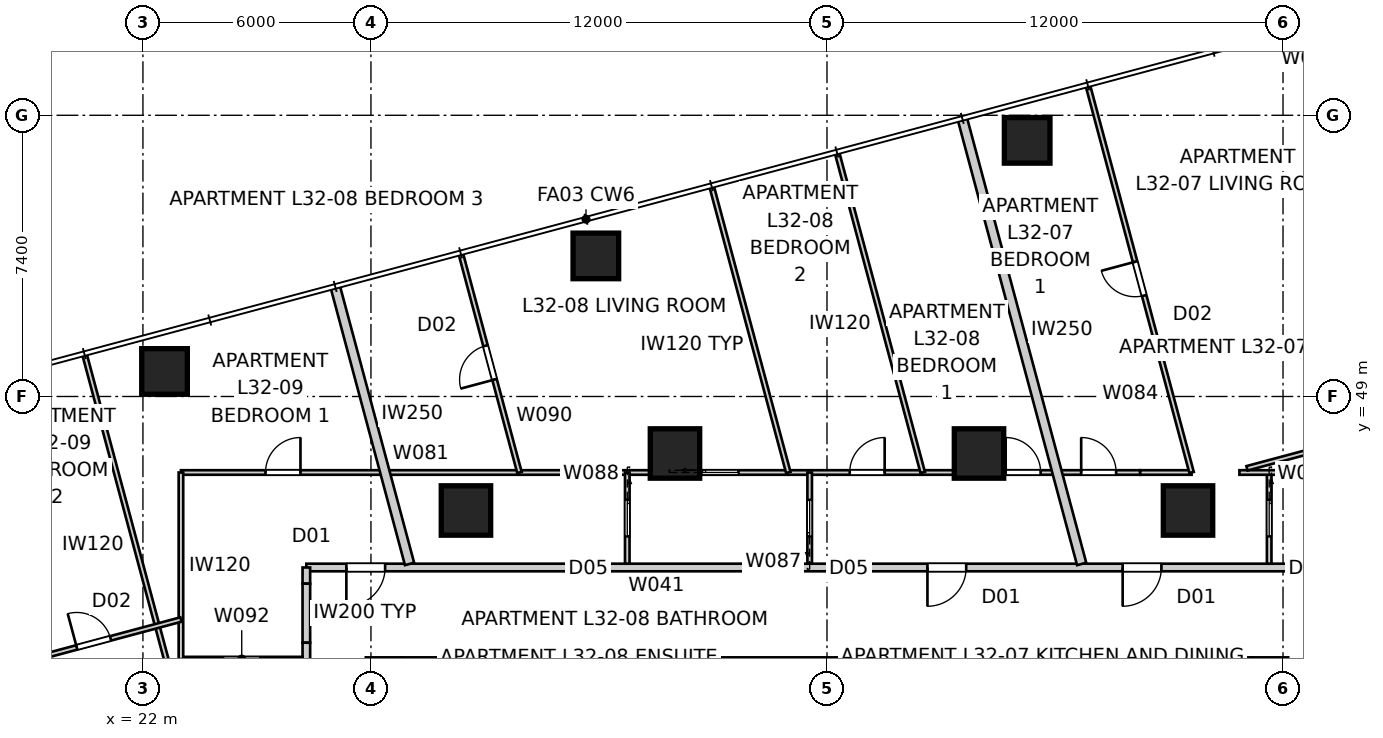
"""IFC4 building model, lengths in metres.
Left out: names, types, materials, properties, quantities, classifications, styles, units other than length and angle.
Written with IfcOpenShell. Run it as: python <this file> out.ifc"""

import sys

from ifc_helpers import new_model, si_unit, direction, frame, frame_2d, origin, origin_2d, place, context, subcontext, project, spatial, rectangle, extrude, element, fill, save


model = new_model("IFC4")
c1 = context("Model", 3, precision=1e-05, world=origin(), true_north=direction((0.0, 1.0)))
c2 = subcontext(c1, "Body", "Model", "MODEL_VIEW")
j1 = project(units=[si_unit("LENGTHUNIT", "METRE"), si_unit("PLANEANGLEUNIT", "RADIAN")], contexts=[c1])
p1 = place(None, origin())
s1 = spatial("IfcSite", under=j1, at=p1, CompositionType="ELEMENT")
p2 = place(p1, origin())
s2 = spatial("IfcBuilding", under=s1, at=p2, CompositionType="ELEMENT")
p3 = place(p2, frame((0.0, 0.0, 118.4)))
s3 = spatial("IfcBuildingStorey", under=s2, at=p3, CompositionType="ELEMENT", Elevation=118.4)
for number, where, z_axis, x_axis in (
    (1, (45.267, 55.74, 0.0), (0.0, 0.0, 1.0), (1.0, 0.0, 0.0)),
    (2, (33.918, 52.699, 0.0), (0.0, 0.0, 1.0), (1.0, 0.0, 0.0)),
    (3, (22.568, 49.658, 0.0), (0.0, 0.0, 1.0), (1.0, 0.0, 0.0)),
):
    element("IfcColumn", number, at=place(p3, frame(where, z_axis=z_axis, x_axis=x_axis)), inside=s3, PredefinedType="COLUMN", context=c2, shape_type="SweptSolid", body=[
        extrude(rectangle(XDim=1.2, YDim=1.2, at=origin_2d()), origin(), (0.0, 0.0, 1.0), 3.4),
    ])
for number, where, z_axis, x_axis in (
    (4, (49.5, 46.0, 0.0), (0.0, 0.0, 1.0), (1.0, 0.0, 0.0)),
    (5, (44.0, 47.5, 0.0), (0.0, 0.0, 1.0), (1.0, 0.0, 0.0)),
    (6, (36.0, 47.5, 0.0), (0.0, 0.0, 1.0), (1.0, 0.0, 0.0)),
    (7, (30.5, 46.0, 0.0), (0.0, 0.0, 1.0), (1.0, 0.0, 0.0)),
):
    element("IfcColumn", number, at=place(p3, frame(where, z_axis=z_axis, x_axis=x_axis)), inside=s3, PredefinedType="COLUMN", context=c2, shape_type="SweptSolid", body=[
        extrude(rectangle(XDim=1.3, YDim=1.3, at=origin_2d()), origin(), (0.0, 0.0, 1.0), 3.4),
    ])
p4 = place(p3, frame((54.5, 44.5, 0.0), z_axis=(0.0, 0.0, 1.0), x_axis=(-1.0, 0.0, 0.0)))
e8 = element("IfcWall", 8, at=p4, inside=s3, PredefinedType="PARTITIONING", context=c2, shape_type="SweptSolid", body=[
    extrude(rectangle(XDim=28.2, YDim=0.2, at=frame_2d((14.1, 0.0))), origin(), (0.0, 0.0, 1.0), 3.25),
])
p5 = place(p4, frame((10.837, 0.0, 0.0)))
e9 = element("IfcOpeningElement", 9, at=p5, cuts=e8, PredefinedType="OPENING", context=c2, shape_type="SweptSolid", body=[
    extrude(rectangle(XDim=1.02, YDim=2.34, at=frame_2d((0.51, 1.17))), frame((0.0, 0.11, 0.0), z_axis=(0.0, -1.0, 0.0), x_axis=(1.0, 0.0, 0.0)), (0.0, 0.0, 1.0), 0.22),
])
p6 = place(p4, frame((5.7, 0.0, 0.0)))
e10 = element("IfcOpeningElement", 10, at=p6, cuts=e8, PredefinedType="OPENING", context=c2, shape_type="SweptSolid", body=[
    extrude(rectangle(XDim=1.02, YDim=2.34, at=frame_2d((0.51, 1.17))), frame((0.0, 0.11, 0.0), z_axis=(0.0, -1.0, 0.0), x_axis=(1.0, 0.0, 0.0)), (0.0, 0.0, 1.0), 0.22),
])
p7 = place(p4, frame((26.127, 0.0, 0.0)))
e11 = element("IfcOpeningElement", 11, at=p7, cuts=e8, PredefinedType="OPENING", context=c2, shape_type="SweptSolid", body=[
    extrude(rectangle(XDim=1.02, YDim=2.34, at=frame_2d((0.51, 1.17))), frame((0.0, 0.11, 0.0), z_axis=(0.0, -1.0, 0.0), x_axis=(1.0, 0.0, 0.0)), (0.0, 0.0, 1.0), 0.22),
])
p8 = place(p3, frame((26.3, 44.5, 0.0), z_axis=(0.0, 0.0, 1.0), x_axis=(0.0, -1.0, 0.0)))
e12 = element("IfcWall", 12, at=p8, inside=s3, PredefinedType="PARTITIONING", context=c2, shape_type="SweptSolid", body=[
    extrude(rectangle(XDim=0.426, YDim=0.2, at=frame_2d((0.213, 0.0))), origin(), (0.0, 0.0, 1.0), 3.25),
])
p9 = place(p3, frame((26.3, 44.074, 0.0), z_axis=(0.0, 0.0, 1.0), x_axis=(0.0, -1.0, 0.0)))
e13 = element("IfcWall", 13, at=p9, inside=s3, PredefinedType="PARTITIONING", context=c2, shape_type="SweptSolid", body=[
    extrude(rectangle(XDim=1.554, YDim=0.2, at=frame_2d((0.777, 0.0))), origin(), (0.0, 0.0, 1.0), 2.722),
])
p10 = place(p3, frame((26.3, 42.52, 0.0), z_axis=(0.0, 0.0, 1.0), x_axis=(0.0, -1.0, 0.0)))
e14 = element("IfcWall", 14, at=p10, inside=s3, PredefinedType="PARTITIONING", context=c2, shape_type="SweptSolid", body=[
    extrude(rectangle(XDim=27.02, YDim=0.2, at=frame_2d((13.51, 0.0))), origin(), (0.0, 0.0, 1.0), 3.25),
])
p11 = place(p10, frame((23.584, 0.0, 0.0)))
e15 = element("IfcOpeningElement", 15, at=p11, cuts=e14, PredefinedType="OPENING", context=c2, shape_type="SweptSolid", body=[
    extrude(rectangle(XDim=1.02, YDim=2.1, at=frame_2d((0.51, 1.05))), frame((0.0, 0.11, 0.0), z_axis=(0.0, -1.0, 0.0), x_axis=(1.0, 0.0, 0.0)), (0.0, 0.0, 1.0), 0.22),
])
p12 = place(p10, frame((13.468, 0.0, 0.0)))
e16 = element("IfcOpeningElement", 16, at=p12, cuts=e14, PredefinedType="OPENING", context=c2, shape_type="SweptSolid", body=[
    extrude(rectangle(XDim=1.02, YDim=2.34, at=frame_2d((0.51, 1.17))), frame((0.0, 0.11, 0.0), z_axis=(0.0, -1.0, 0.0), x_axis=(1.0, 0.0, 0.0)), (0.0, 0.0, 1.0), 0.22),
])
p13 = place(p3, frame((43.56, 56.318, 0.0), z_axis=(0.0, 0.0, 1.0), x_axis=(0.258824223352, -0.965924438766, 0.0)))
e17 = element("IfcWall", 17, at=p13, inside=s3, PredefinedType="PARTITIONING", context=c2, shape_type="SweptSolid", body=[
    extrude(rectangle(XDim=12.138, YDim=0.25, at=frame_2d((6.069, 0.0))), origin(), (0.0, 0.0, 1.0), 3.25),
])
p14 = place(p3, frame((27.058, 51.896, 0.0), z_axis=(0.0, 0.0, 1.0), x_axis=(0.258822171171, -0.965924988656, 0.0)))
e18 = element("IfcWall", 18, at=p14, inside=s3, PredefinedType="PARTITIONING", context=c2, shape_type="SweptSolid", body=[
    extrude(rectangle(XDim=7.56, YDim=0.25, at=frame_2d((3.78, 0.0))), origin(), (0.0, 0.0, 1.0), 3.25),
])
p15 = place(p3, frame((51.636, 47.0, 0.0), z_axis=(0.0, 0.0, 1.0), x_axis=(0.0, -1.0, 0.0)))
e19 = element("IfcWall", 19, at=p15, inside=s3, PredefinedType="PARTITIONING", context=c2, shape_type="SweptSolid", body=[
    extrude(rectangle(XDim=2.4, YDim=0.12, at=frame_2d((1.2, 0.0))), origin(), (0.0, 0.0, 1.0), 3.25),
])
p16 = place(p15, frame((0.72, 0.0, 0.0)))
e20 = element("IfcOpeningElement", 20, at=p16, cuts=e19, PredefinedType="OPENING", context=c2, shape_type="SweptSolid", body=[
    extrude(rectangle(XDim=0.96, YDim=2.1, at=frame_2d((0.48, 1.05))), frame((0.0, 0.07, 0.0), z_axis=(0.0, -1.0, 0.0), x_axis=(1.0, 0.0, 0.0)), (0.0, 0.0, 1.0), 0.14),
])
p17 = place(p3, frame((23.0, 47.0, 0.0), z_axis=(0.0, 0.0, 1.0), x_axis=(1.0, 0.0, 0.0)))
e21 = element("IfcWall", 21, at=p17, inside=s3, PredefinedType="PARTITIONING", context=c2, shape_type="SweptSolid", body=[
    extrude(rectangle(XDim=25.241, YDim=0.12, at=frame_2d((12.62, 0.0))), origin(), (0.0, 0.0, 1.0), 2.55),
])
p18 = place(p17, frame((21.702, 0.0, 0.0)))
e22 = element("IfcOpeningElement", 22, at=p18, cuts=e21, PredefinedType="OPENING", context=c2, shape_type="SweptSolid", body=[
    extrude(rectangle(XDim=0.92, YDim=2.34, at=frame_2d((0.46, 1.17))), frame((0.0, 0.07, 0.0), z_axis=(0.0, -1.0, 0.0), x_axis=(1.0, 0.0, 0.0)), (0.0, 0.0, 1.0), 0.14),
])
p19 = place(p17, frame((17.598, 0.0, 0.0)))
e23 = element("IfcOpeningElement", 23, at=p19, cuts=e21, PredefinedType="OPENING", context=c2, shape_type="SweptSolid", body=[
    extrude(rectangle(XDim=0.92, YDim=2.34, at=frame_2d((0.46, 1.17))), frame((0.0, 0.07, 0.0), z_axis=(0.0, -1.0, 0.0), x_axis=(1.0, 0.0, 0.0)), (0.0, 0.0, 1.0), 0.14),
])
p20 = place(p17, frame((23.689, 0.0, 0.0)))
e24 = element("IfcOpeningElement", 24, at=p20, cuts=e21, PredefinedType="OPENING", context=c2, shape_type="SweptSolid", body=[
    extrude(rectangle(XDim=0.92, YDim=2.34, at=frame_2d((0.46, 1.17))), frame((0.0, 0.07, 0.0), z_axis=(0.0, -1.0, 0.0), x_axis=(1.0, 0.0, 0.0)), (0.0, 0.0, 1.0), 0.14),
])
p21 = place(p17, frame((2.225, 0.0, 0.0)))
e25 = element("IfcOpeningElement", 25, at=p21, cuts=e21, PredefinedType="OPENING", context=c2, shape_type="SweptSolid", body=[
    extrude(rectangle(XDim=0.92, YDim=2.34, at=frame_2d((0.46, 1.17))), frame((0.0, 0.07, 0.0), z_axis=(0.0, -1.0, 0.0), x_axis=(1.0, 0.0, 0.0)), (0.0, 0.0, 1.0), 0.14),
])
p22 = place(p17, frame((13.709, 0.0, 0.0)))
e26 = element("IfcOpeningElement", 26, at=p22, cuts=e21, PredefinedType="OPENING", context=c2, shape_type="SweptSolid", body=[
    extrude(rectangle(XDim=0.96, YDim=2.1, at=frame_2d((0.48, 1.05))), frame((0.0, 0.07, 0.0), z_axis=(0.0, -1.0, 0.0), x_axis=(1.0, 0.0, 0.0)), (0.0, 0.0, 1.0), 0.14),
])
p23 = place(p3, frame((50.853, 47.0, 0.0), z_axis=(0.0, 0.0, 1.0), x_axis=(1.0, 0.0, 0.0)))
e27 = element("IfcWall", 27, at=p23, inside=s3, PredefinedType="PARTITIONING", context=c2, shape_type="SweptSolid", body=[
    extrude(rectangle(XDim=6.147, YDim=0.12, at=frame_2d((3.074, 0.0))), origin(), (0.0, 0.0, 1.0), 3.25),
])
p24 = place(p23, frame((3.585, 0.0, 0.0)))
e28 = element("IfcOpeningElement", 28, at=p24, cuts=e27, PredefinedType="OPENING", context=c2, shape_type="SweptSolid", body=[
    extrude(rectangle(XDim=0.96, YDim=2.1, at=frame_2d((0.48, 1.05))), frame((0.0, 0.07, 0.0), z_axis=(0.0, -1.0, 0.0), x_axis=(1.0, 0.0, 0.0)), (0.0, 0.0, 1.0), 0.14),
])
p25 = place(p3, frame((49.594, 47.0, 0.0), z_axis=(0.0, 0.0, 1.0), x_axis=(-0.258797552287, 0.965931585015, 0.0)))
e29 = element("IfcWall", 29, at=p25, inside=s3, PredefinedType="PARTITIONING", context=c2, shape_type="SweptSolid", body=[
    extrude(rectangle(XDim=10.522, YDim=0.12, at=frame_2d((5.261, 0.0))), origin(), (0.0, 0.0, 1.0), 2.722),
])
p26 = place(p25, frame((4.821, 0.0, 0.0)))
e30 = element("IfcOpeningElement", 30, at=p26, cuts=e29, PredefinedType="OPENING", context=c2, shape_type="SweptSolid", body=[
    extrude(rectangle(XDim=0.92, YDim=2.34, at=frame_2d((0.46, 1.17))), frame((0.0, 0.07, 0.0), z_axis=(0.0, -1.0, 0.0), x_axis=(1.0, 0.0, 0.0)), (0.0, 0.0, 1.0), 0.14),
])
p27 = place(p3, frame((60.089, 49.532, 0.0), z_axis=(0.0, 0.0, 1.0), x_axis=(-0.965927203676, -0.25881390457, 0.0)))
e31 = element("IfcWall", 31, at=p27, inside=s3, PredefinedType="PARTITIONING", context=c2, shape_type="SweptSolid", body=[
    extrude(rectangle(XDim=9.357, YDim=0.12, at=frame_2d((4.678, 0.0))), origin(), (0.0, 0.0, 1.0), 2.638),
])
p28 = place(p3, frame((39.544, 44.6, 0.0), z_axis=(0.0, 0.0, 1.0), x_axis=(0.0, 1.0, 0.0)))
e32 = element("IfcWall", 32, at=p28, inside=s3, PredefinedType="PARTITIONING", context=c2, shape_type="SweptSolid", body=[
    extrude(rectangle(XDim=2.4, YDim=0.12, at=frame_2d((1.2, 0.0))), origin(), (0.0, 0.0, 1.0), 3.25),
])
p29 = place(p28, frame((0.72, 0.0, 0.0)))
e33 = element("IfcOpeningElement", 33, at=p29, cuts=e32, PredefinedType="OPENING", context=c2, shape_type="SweptSolid", body=[
    extrude(rectangle(XDim=0.96, YDim=2.1, at=frame_2d((0.48, 1.05))), frame((0.0, 0.07, 0.0), z_axis=(0.0, -1.0, 0.0), x_axis=(1.0, 0.0, 0.0)), (0.0, 0.0, 1.0), 0.14),
])
p30 = place(p3, frame((34.745, 47.0, 0.0), z_axis=(0.0, 0.0, 1.0), x_axis=(0.0, -1.0, 0.0)))
e34 = element("IfcWall", 34, at=p30, inside=s3, PredefinedType="PARTITIONING", context=c2, shape_type="SweptSolid", body=[
    extrude(rectangle(XDim=2.4, YDim=0.12, at=frame_2d((1.2, 0.0))), origin(), (0.0, 0.0, 1.0), 3.25),
])
p31 = place(p30, frame((0.72, 0.0, 0.0)))
e35 = element("IfcOpeningElement", 35, at=p31, cuts=e34, PredefinedType="OPENING", context=c2, shape_type="SweptSolid", body=[
    extrude(rectangle(XDim=0.96, YDim=2.1, at=frame_2d((0.48, 1.05))), frame((0.0, 0.07, 0.0), z_axis=(0.0, -1.0, 0.0), x_axis=(1.0, 0.0, 0.0)), (0.0, 0.0, 1.0), 0.14),
])
p32 = place(p3, frame((36.969, 54.511, 0.0), z_axis=(0.0, 0.0, 1.0), x_axis=(0.258813509689, -0.965927309482, 0.0)))
e36 = element("IfcWall", 36, at=p32, inside=s3, PredefinedType="PARTITIONING", context=c2, shape_type="SweptSolid", body=[
    extrude(rectangle(XDim=7.776, YDim=0.12, at=frame_2d((3.888, 0.0))), origin(), (0.0, 0.0, 1.0), 3.25),
])
p33 = place(p3, frame((31.908, 47.0, 0.0), z_axis=(0.0, 0.0, 1.0), x_axis=(-0.258812722515, 0.965927520399, 0.0)))
e37 = element("IfcWall", 37, at=p33, inside=s3, PredefinedType="PARTITIONING", context=c2, shape_type="SweptSolid", body=[
    extrude(rectangle(XDim=5.945, YDim=0.12, at=frame_2d((2.972, 0.0))), origin(), (0.0, 0.0, 1.0), 3.25),
])
p34 = place(p33, frame((2.532, 0.0, 0.0)))
e38 = element("IfcOpeningElement", 38, at=p34, cuts=e37, PredefinedType="OPENING", context=c2, shape_type="SweptSolid", body=[
    extrude(rectangle(XDim=0.92, YDim=2.34, at=frame_2d((0.46, 1.17))), frame((0.0, 0.07, 0.0), z_axis=(0.0, -1.0, 0.0), x_axis=(1.0, 0.0, 0.0)), (0.0, 0.0, 1.0), 0.14),
])
p35 = place(p3, frame((42.519, 47.0, 0.0), z_axis=(0.0, 0.0, 1.0), x_axis=(-0.258819860698, 0.965925607751, 0.0)))
e39 = element("IfcWall", 39, at=p35, inside=s3, PredefinedType="PARTITIONING", context=c2, shape_type="SweptSolid", body=[
    extrude(rectangle(XDim=8.691, YDim=0.12, at=frame_2d((4.346, 0.0))), origin(), (0.0, 0.0, 1.0), 3.25),
])
p36 = place(p3, frame((26.2, 42.089, 0.0), z_axis=(0.0, 0.0, 1.0), x_axis=(-1.0, 0.0, 0.0)))
e40 = element("IfcWall", 40, at=p36, inside=s3, PredefinedType="PARTITIONING", context=c2, shape_type="SweptSolid", body=[
    extrude(rectangle(XDim=3.2, YDim=0.12, at=frame_2d((1.6, 0.0))), origin(), (0.0, 0.0, 1.0), 3.25),
])
p37 = place(p36, frame((1.12, 0.0, 0.0)))
e41 = element("IfcOpeningElement", 41, at=p37, cuts=e40, PredefinedType="OPENING", context=c2, shape_type="SweptSolid", body=[
    extrude(rectangle(XDim=0.96, YDim=2.1, at=frame_2d((0.48, 1.05))), frame((0.0, 0.07, 0.0), z_axis=(0.0, -1.0, 0.0), x_axis=(1.0, 0.0, 0.0)), (0.0, 0.0, 1.0), 0.14),
])
p38 = place(p3, frame((23.0, 42.089, 0.0), z_axis=(0.0, 0.0, 1.0), x_axis=(0.0, 1.0, 0.0)))
e42 = element("IfcWall", 42, at=p38, inside=s3, PredefinedType="PARTITIONING", context=c2, shape_type="SweptSolid", body=[
    extrude(rectangle(XDim=4.911, YDim=0.12, at=frame_2d((2.456, 0.0))), origin(), (0.0, 0.0, 1.0), 3.25),
])
p39 = place(p3, frame((23.0, 40.64, 0.0), z_axis=(0.0, 0.0, 1.0), x_axis=(-0.258790139317, 0.965933571108, 0.0)))
e43 = element("IfcWall", 43, at=p39, inside=s3, PredefinedType="PARTITIONING", context=c2, shape_type="SweptSolid", body=[
    extrude(rectangle(XDim=9.783, YDim=0.12, at=frame_2d((4.892, 0.0))), origin(), (0.0, 0.0, 1.0), 2.638),
])
p40 = place(p3, frame((11.952, 40.17, 0.0), z_axis=(0.0, 0.0, 1.0), x_axis=(0.965923183761, 0.258828906952, 0.0)))
e44 = element("IfcWall", 44, at=p40, inside=s3, PredefinedType="PARTITIONING", context=c2, shape_type="SweptSolid", body=[
    extrude(rectangle(XDim=11.438, YDim=0.12, at=frame_2d((5.719, 0.0))), origin(), (0.0, 0.0, 1.0), 3.25),
])
p41 = place(p40, frame((3.233, 0.0, 0.0)))
e45 = element("IfcOpeningElement", 45, at=p41, cuts=e44, PredefinedType="OPENING", context=c2, shape_type="SweptSolid", body=[
    extrude(rectangle(XDim=0.92, YDim=2.34, at=frame_2d((0.46, 1.17))), frame((0.0, 0.07, 0.0), z_axis=(0.0, -1.0, 0.0), x_axis=(1.0, 0.0, 0.0)), (0.0, 0.0, 1.0), 0.14),
])
p42 = place(p40, frame((8.6, 0.0, 0.0)))
e46 = element("IfcOpeningElement", 46, at=p42, cuts=e44, PredefinedType="OPENING", context=c2, shape_type="SweptSolid", body=[
    extrude(rectangle(XDim=0.92, YDim=2.34, at=frame_2d((0.46, 1.17))), frame((0.0, 0.07, 0.0), z_axis=(0.0, -1.0, 0.0), x_axis=(1.0, 0.0, 0.0)), (0.0, 0.0, 1.0), 0.14),
])
p43 = place(p3, frame((48.241, 47.0, 0.0), z_axis=(0.0, 0.0, 1.0), x_axis=(1.0, 0.0, 0.0)))
e47 = element("IfcWall", 47, at=p43, inside=s3, PredefinedType="PARTITIONING", context=c2, shape_type="SweptSolid", body=[
    extrude(rectangle(XDim=1.353, YDim=0.12, at=frame_2d((0.676, 0.0))), origin(), (0.0, 0.0, 1.0), 3.25),
])
p44 = place(p5, origin())
e48 = element("IfcDoor", 48, at=p44, inside=s3, OperationType="SINGLE_SWING_RIGHT", PredefinedType="DOOR", context=c2, shape_type="SweptSolid", body=[
    extrude(rectangle(XDim=1.02, YDim=2.34, at=frame_2d((0.51, 1.17))), frame((0.0, 0.025, 0.0), z_axis=(0.0, -1.0, 0.0), x_axis=(1.0, 0.0, 0.0)), (0.0, 0.0, 1.0), 0.05),
])
fill(e9, e48)
p45 = place(p6, origin())
e49 = element("IfcDoor", 49, at=p45, inside=s3, OperationType="SINGLE_SWING_RIGHT", PredefinedType="DOOR", context=c2, shape_type="SweptSolid", body=[
    extrude(rectangle(XDim=1.02, YDim=2.34, at=frame_2d((0.51, 1.17))), frame((0.0, 0.025, 0.0), z_axis=(0.0, -1.0, 0.0), x_axis=(1.0, 0.0, 0.0)), (0.0, 0.0, 1.0), 0.05),
])
fill(e10, e49)
p46 = place(p7, origin())
e50 = element("IfcDoor", 50, at=p46, inside=s3, OperationType="SINGLE_SWING_RIGHT", PredefinedType="DOOR", context=c2, shape_type="SweptSolid", body=[
    extrude(rectangle(XDim=1.02, YDim=2.34, at=frame_2d((0.51, 1.17))), frame((0.0, 0.025, 0.0), z_axis=(0.0, -1.0, 0.0), x_axis=(1.0, 0.0, 0.0)), (0.0, 0.0, 1.0), 0.05),
])
fill(e11, e50)
p47 = place(p18, origin())
e51 = element("IfcDoor", 51, at=p47, inside=s3, OperationType="SINGLE_SWING_LEFT", PredefinedType="DOOR", context=c2, shape_type="SweptSolid", body=[
    extrude(rectangle(XDim=0.92, YDim=2.34, at=frame_2d((0.46, 1.17))), frame((0.0, 0.025, 0.0), z_axis=(0.0, -1.0, 0.0), x_axis=(1.0, 0.0, 0.0)), (0.0, 0.0, 1.0), 0.05),
])
fill(e22, e51)
p48 = place(p19, origin())
e52 = element("IfcDoor", 52, at=p48, inside=s3, OperationType="SINGLE_SWING_RIGHT", PredefinedType="DOOR", context=c2, shape_type="SweptSolid", body=[
    extrude(rectangle(XDim=0.92, YDim=2.34, at=frame_2d((0.46, 1.17))), frame((0.0, 0.025, 0.0), z_axis=(0.0, -1.0, 0.0), x_axis=(1.0, 0.0, 0.0)), (0.0, 0.0, 1.0), 0.05),
])
fill(e23, e52)
p49 = place(p29, origin())
e53 = element("IfcDoor", 53, at=p49, inside=s3, OperationType="SLIDING_TO_LEFT", PredefinedType="DOOR", context=c2, shape_type="SweptSolid", body=[
    extrude(rectangle(XDim=0.96, YDim=2.1, at=frame_2d((0.48, 1.05))), frame((0.0, 0.025, 0.0), z_axis=(0.0, -1.0, 0.0), x_axis=(1.0, 0.0, 0.0)), (0.0, 0.0, 1.0), 0.05),
])
fill(e33, e53)
p50 = place(p16, origin())
e54 = element("IfcDoor", 54, at=p50, inside=s3, OperationType="SLIDING_TO_LEFT", PredefinedType="DOOR", context=c2, shape_type="SweptSolid", body=[
    extrude(rectangle(XDim=0.96, YDim=2.1, at=frame_2d((0.48, 1.05))), frame((0.0, 0.025, 0.0), z_axis=(0.0, -1.0, 0.0), x_axis=(1.0, 0.0, 0.0)), (0.0, 0.0, 1.0), 0.05),
])
fill(e20, e54)
p51 = place(p20, origin())
e55 = element("IfcDoor", 55, at=p51, inside=s3, OperationType="SINGLE_SWING_LEFT", PredefinedType="DOOR", context=c2, shape_type="SweptSolid", body=[
    extrude(rectangle(XDim=0.92, YDim=2.34, at=frame_2d((0.46, 1.17))), frame((0.0, 0.025, 0.0), z_axis=(0.0, -1.0, 0.0), x_axis=(1.0, 0.0, 0.0)), (0.0, 0.0, 1.0), 0.05),
])
fill(e24, e55)
p52 = place(p21, origin())
e56 = element("IfcDoor", 56, at=p52, inside=s3, OperationType="SINGLE_SWING_RIGHT", PredefinedType="DOOR", context=c2, shape_type="SweptSolid", body=[
    extrude(rectangle(XDim=0.92, YDim=2.34, at=frame_2d((0.46, 1.17))), frame((0.0, 0.025, 0.0), z_axis=(0.0, -1.0, 0.0), x_axis=(1.0, 0.0, 0.0)), (0.0, 0.0, 1.0), 0.05),
])
fill(e25, e56)
p53 = place(p37, origin())
e57 = element("IfcDoor", 57, at=p53, inside=s3, OperationType="SLIDING_TO_LEFT", PredefinedType="DOOR", context=c2, shape_type="SweptSolid", body=[
    extrude(rectangle(XDim=0.96, YDim=2.1, at=frame_2d((0.48, 1.05))), frame((0.0, 0.025, 0.0), z_axis=(0.0, -1.0, 0.0), x_axis=(1.0, 0.0, 0.0)), (0.0, 0.0, 1.0), 0.05),
])
fill(e41, e57)
p54 = place(p22, origin())
e58 = element("IfcDoor", 58, at=p54, inside=s3, OperationType="SLIDING_TO_LEFT", PredefinedType="DOOR", context=c2, shape_type="SweptSolid", body=[
    extrude(rectangle(XDim=0.96, YDim=2.1, at=frame_2d((0.48, 1.05))), frame((0.0, 0.025, 0.0), z_axis=(0.0, -1.0, 0.0), x_axis=(1.0, 0.0, 0.0)), (0.0, 0.0, 1.0), 0.05),
])
fill(e26, e58)
p55 = place(p31, origin())
e59 = element("IfcDoor", 59, at=p55, inside=s3, OperationType="SLIDING_TO_LEFT", PredefinedType="DOOR", context=c2, shape_type="SweptSolid", body=[
    extrude(rectangle(XDim=0.96, YDim=2.1, at=frame_2d((0.48, 1.05))), frame((0.0, 0.025, 0.0), z_axis=(0.0, -1.0, 0.0), x_axis=(1.0, 0.0, 0.0)), (0.0, 0.0, 1.0), 0.05),
])
fill(e35, e59)
p56 = place(p34, origin())
e60 = element("IfcDoor", 60, at=p56, inside=s3, OperationType="SINGLE_SWING_LEFT", PredefinedType="DOOR", context=c2, shape_type="SweptSolid", body=[
    extrude(rectangle(XDim=0.92, YDim=2.34, at=frame_2d((0.46, 1.17))), frame((0.0, 0.025, 0.0), z_axis=(0.0, -1.0, 0.0), x_axis=(1.0, 0.0, 0.0)), (0.0, 0.0, 1.0), 0.05),
])
fill(e38, e60)
p57 = place(p42, origin())
e61 = element("IfcDoor", 61, at=p57, inside=s3, OperationType="SINGLE_SWING_LEFT", PredefinedType="DOOR", context=c2, shape_type="SweptSolid", body=[
    extrude(rectangle(XDim=0.92, YDim=2.34, at=frame_2d((0.46, 1.17))), frame((0.0, 0.025, 0.0), z_axis=(0.0, -1.0, 0.0), x_axis=(1.0, 0.0, 0.0)), (0.0, 0.0, 1.0), 0.05),
])
fill(e46, e61)
p58 = place(p26, origin())
e62 = element("IfcDoor", 62, at=p58, inside=s3, OperationType="SINGLE_SWING_RIGHT", PredefinedType="DOOR", context=c2, shape_type="SweptSolid", body=[
    extrude(rectangle(XDim=0.92, YDim=2.34, at=frame_2d((0.46, 1.17))), frame((0.0, 0.025, 0.0), z_axis=(0.0, -1.0, 0.0), x_axis=(1.0, 0.0, 0.0)), (0.0, 0.0, 1.0), 0.05),
])
fill(e30, e62)
save(model, sys.argv[1])
